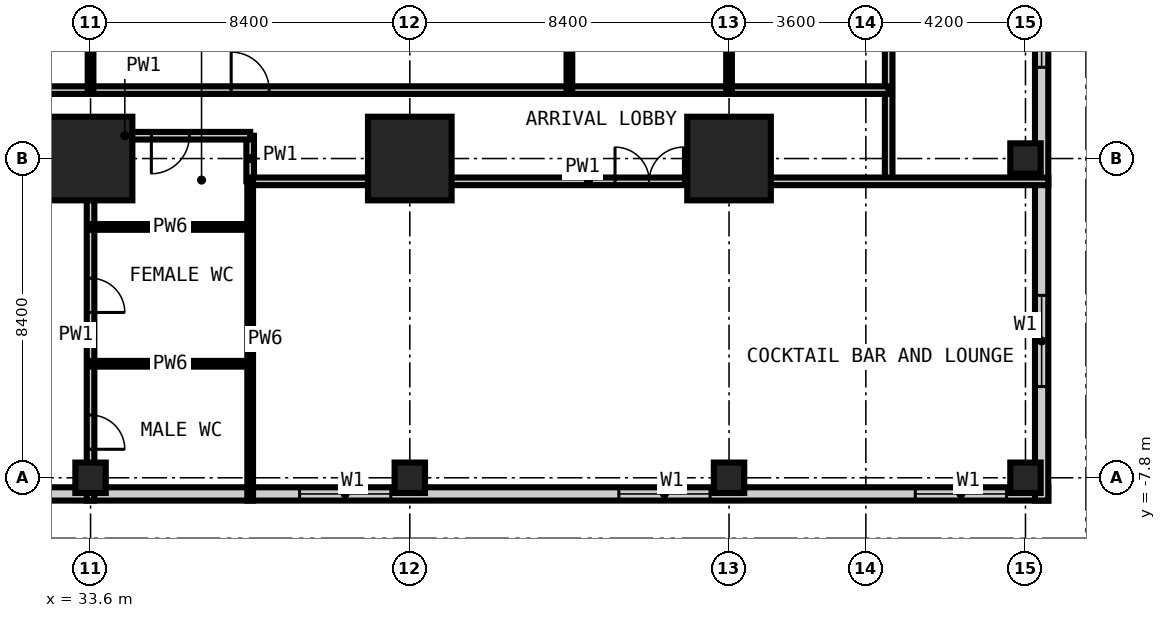
"""IFC4 building model, lengths in metres.
Left out: names, types, materials, properties, quantities, classifications, styles, units other than length and angle.
Written with IfcOpenShell. Run it as: python <this file> out.ifc"""

import sys

from ifc_helpers import new_model, si_unit, direction, frame, frame_2d, origin, origin_2d, place, context, subcontext, project, spatial, rectangle, extrude, element, fill, save


model = new_model("IFC4")
c1 = context("Model", 3, precision=1e-05, world=origin(), true_north=direction((0.0, 1.0)))
c2 = subcontext(c1, "Body", "Model", "MODEL_VIEW")
j1 = project(units=[si_unit("LENGTHUNIT", "METRE"), si_unit("PLANEANGLEUNIT", "RADIAN")], contexts=[c1])
p1 = place(None, origin())
s1 = spatial("IfcSite", under=j1, at=p1, CompositionType="ELEMENT")
p2 = place(p1, origin())
s2 = spatial("IfcBuilding", under=s1, at=p2, CompositionType="ELEMENT")
p3 = place(p2, origin())
s3 = spatial("IfcBuildingStorey", under=s2, at=p3, CompositionType="ELEMENT", Elevation=0.0)
for number, where, z_axis, x_axis in (
    (1, (33.6, 0.6, -0.3), (0.0, 0.0, 1.0), (1.0, 0.0, 0.0)),
    (2, (42.0, 0.6, -0.3), (0.0, 0.0, 1.0), (1.0, 0.0, 0.0)),
    (3, (50.4, 0.6, -0.3), (0.0, 0.0, 1.0), (1.0, 0.0, 0.0)),
):
    element("IfcColumn", number, at=place(p3, frame(where, z_axis=z_axis, x_axis=x_axis)), inside=s3, PredefinedType="COLUMN", context=c2, shape_type="SweptSolid", body=[
        extrude(rectangle(XDim=2.2, YDim=2.2, at=origin_2d()), origin(), (0.0, 0.0, 1.0), 6.0),
    ])
for number, where, z_axis, x_axis in (
    (4, (33.6, -7.8, -0.3), (0.0, 0.0, 1.0), (1.0, 0.0, 0.0)),
    (5, (42.0, -7.8, -0.3), (0.0, 0.0, 1.0), (1.0, 0.0, 0.0)),
    (6, (50.4, -7.8, -0.3), (0.0, 0.0, 1.0), (1.0, 0.0, 0.0)),
    (7, (58.2, -7.8, -0.3), (0.0, 0.0, 1.0), (1.0, 0.0, 0.0)),
    (8, (58.2, 0.6, -0.3), (0.0, 0.0, 1.0), (1.0, 0.0, 0.0)),
):
    element("IfcColumn", number, at=place(p3, frame(where, z_axis=z_axis, x_axis=x_axis)), inside=s3, PredefinedType="COLUMN", context=c2, shape_type="SweptSolid", body=[
        extrude(rectangle(XDim=0.8, YDim=0.8, at=origin_2d()), origin(), (0.0, 0.0, 1.0), 6.0),
    ])
p4 = place(p3, frame((-33.6, -8.225, 0.0), z_axis=(0.0, 0.0, 1.0), x_axis=(1.0, 0.0, 0.0)))
e9 = element("IfcWall", 9, at=p4, inside=s3, PredefinedType="SOLIDWALL", context=c2, shape_type="SweptSolid", body=[
    extrude(rectangle(XDim=92.4, YDim=0.35, at=frame_2d((46.2, 0.0))), origin(), (0.0, 0.0, 1.0), 5.7),
])
p5 = place(p4, frame((5.4, 0.0, 0.0)))
e10 = element("IfcOpeningElement", 10, at=p5, cuts=e9, PredefinedType="OPENING", context=c2, shape_type="SweptSolid", body=[
    extrude(rectangle(XDim=1.8, YDim=2.7, at=frame_2d((0.9, 1.35))), frame((0.0, 0.185, 0.0), z_axis=(0.0, -1.0, 0.0), x_axis=(1.0, 0.0, 0.0)), (0.0, 0.0, 1.0), 0.37),
])
p6 = place(p4, frame((2.8, 0.0, 0.9)))
e11 = element("IfcOpeningElement", 11, at=p6, cuts=e9, PredefinedType="OPENING", context=c2, shape_type="SweptSolid", body=[
    extrude(rectangle(XDim=2.4, YDim=2.4, at=frame_2d((1.2, 1.2))), frame((0.0, 0.185, 0.0), z_axis=(0.0, -1.0, 0.0), x_axis=(1.0, 0.0, 0.0)), (0.0, 0.0, 1.0), 0.37),
])
p7 = place(p4, frame((9.3, 0.0, 0.9)))
e12 = element("IfcOpeningElement", 12, at=p7, cuts=e9, PredefinedType="OPENING", context=c2, shape_type="SweptSolid", body=[
    extrude(rectangle(XDim=2.4, YDim=2.4, at=frame_2d((1.2, 1.2))), frame((0.0, 0.185, 0.0), z_axis=(0.0, -1.0, 0.0), x_axis=(1.0, 0.0, 0.0)), (0.0, 0.0, 1.0), 0.37),
])
p8 = place(p4, frame((13.8, 0.0, 0.9)))
e13 = element("IfcOpeningElement", 13, at=p8, cuts=e9, PredefinedType="OPENING", context=c2, shape_type="SweptSolid", body=[
    extrude(rectangle(XDim=2.4, YDim=2.4, at=frame_2d((1.2, 1.2))), frame((0.0, 0.185, 0.0), z_axis=(0.0, -1.0, 0.0), x_axis=(1.0, 0.0, 0.0)), (0.0, 0.0, 1.0), 0.37),
])
p9 = place(p4, frame((19.3, 0.0, 0.0)))
e14 = element("IfcOpeningElement", 14, at=p9, cuts=e9, PredefinedType="OPENING", context=c2, shape_type="SweptSolid", body=[
    extrude(rectangle(XDim=1.2, YDim=2.4, at=frame_2d((0.6, 1.2))), frame((0.0, 0.185, 0.0), z_axis=(0.0, -1.0, 0.0), x_axis=(1.0, 0.0, 0.0)), (0.0, 0.0, 1.0), 0.37),
])
p10 = place(p4, frame((26.8, 0.0, 0.0)))
e15 = element("IfcOpeningElement", 15, at=p10, cuts=e9, PredefinedType="OPENING", context=c2, shape_type="SweptSolid", body=[
    extrude(rectangle(XDim=2.4, YDim=3.0, at=frame_2d((1.2, 1.5))), frame((0.0, 0.185, 0.0), z_axis=(0.0, -1.0, 0.0), x_axis=(1.0, 0.0, 0.0)), (0.0, 0.0, 1.0), 0.37),
])
p11 = place(p4, frame((36.9, 0.0, 0.0)))
e16 = element("IfcOpeningElement", 16, at=p11, cuts=e9, PredefinedType="OPENING", context=c2, shape_type="SweptSolid", body=[
    extrude(rectangle(XDim=1.8, YDim=2.4, at=frame_2d((0.9, 1.2))), frame((0.0, 0.185, 0.0), z_axis=(0.0, -1.0, 0.0), x_axis=(1.0, 0.0, 0.0)), (0.0, 0.0, 1.0), 0.37),
])
p12 = place(p4, frame((38.9, 0.0, 0.9)))
e17 = element("IfcOpeningElement", 17, at=p12, cuts=e9, PredefinedType="OPENING", context=c2, shape_type="SweptSolid", body=[
    extrude(rectangle(XDim=2.4, YDim=2.4, at=frame_2d((1.2, 1.2))), frame((0.0, 0.185, 0.0), z_axis=(0.0, -1.0, 0.0), x_axis=(1.0, 0.0, 0.0)), (0.0, 0.0, 1.0), 0.37),
])
p13 = place(p4, frame((53.7, 0.0, 0.0)))
e18 = element("IfcOpeningElement", 18, at=p13, cuts=e9, PredefinedType="OPENING", context=c2, shape_type="SweptSolid", body=[
    extrude(rectangle(XDim=1.8, YDim=2.4, at=frame_2d((0.9, 1.2))), frame((0.0, 0.185, 0.0), z_axis=(0.0, -1.0, 0.0), x_axis=(1.0, 0.0, 0.0)), (0.0, 0.0, 1.0), 0.37),
])
p14 = place(p4, frame((51.1, 0.0, 0.9)))
e19 = element("IfcOpeningElement", 19, at=p14, cuts=e9, PredefinedType="OPENING", context=c2, shape_type="SweptSolid", body=[
    extrude(rectangle(XDim=2.4, YDim=2.4, at=frame_2d((1.2, 1.2))), frame((0.0, 0.185, 0.0), z_axis=(0.0, -1.0, 0.0), x_axis=(1.0, 0.0, 0.0)), (0.0, 0.0, 1.0), 0.37),
])
p15 = place(p4, frame((61.8, 0.0, 0.0)))
e20 = element("IfcOpeningElement", 20, at=p15, cuts=e9, PredefinedType="OPENING", context=c2, shape_type="SweptSolid", body=[
    extrude(rectangle(XDim=2.4, YDim=3.0, at=frame_2d((1.2, 1.5))), frame((0.0, 0.185, 0.0), z_axis=(0.0, -1.0, 0.0), x_axis=(1.0, 0.0, 0.0)), (0.0, 0.0, 1.0), 0.37),
])
p16 = place(p4, frame((72.7, 0.0, 0.9)))
e21 = element("IfcOpeningElement", 21, at=p16, cuts=e9, PredefinedType="OPENING", context=c2, shape_type="SweptSolid", body=[
    extrude(rectangle(XDim=2.4, YDim=2.4, at=frame_2d((1.2, 1.2))), frame((0.0, 0.185, 0.0), z_axis=(0.0, -1.0, 0.0), x_axis=(1.0, 0.0, 0.0)), (0.0, 0.0, 1.0), 0.37),
])
p17 = place(p4, frame((81.1, 0.0, 0.9)))
e22 = element("IfcOpeningElement", 22, at=p17, cuts=e9, PredefinedType="OPENING", context=c2, shape_type="SweptSolid", body=[
    extrude(rectangle(XDim=2.4, YDim=2.4, at=frame_2d((1.2, 1.2))), frame((0.0, 0.185, 0.0), z_axis=(0.0, -1.0, 0.0), x_axis=(1.0, 0.0, 0.0)), (0.0, 0.0, 1.0), 0.37),
])
p18 = place(p4, frame((88.9, 0.0, 0.9)))
e23 = element("IfcOpeningElement", 23, at=p18, cuts=e9, PredefinedType="OPENING", context=c2, shape_type="SweptSolid", body=[
    extrude(rectangle(XDim=2.4, YDim=2.4, at=frame_2d((1.2, 1.2))), frame((0.0, 0.185, 0.0), z_axis=(0.0, -1.0, 0.0), x_axis=(1.0, 0.0, 0.0)), (0.0, 0.0, 1.0), 0.37),
])
p19 = place(p3, frame((58.625, -8.4, 0.0), z_axis=(0.0, 0.0, 1.0), x_axis=(0.0, 1.0, 0.0)))
e24 = element("IfcWall", 24, at=p19, inside=s3, PredefinedType="SOLIDWALL", context=c2, shape_type="SweptSolid", body=[
    extrude(rectangle(XDim=67.2, YDim=0.35, at=frame_2d((33.6, 0.0))), origin(), (0.0, 0.0, 1.0), 5.7),
])
p20 = place(p19, frame((3.0, 0.0, 0.9)))
e25 = element("IfcOpeningElement", 25, at=p20, cuts=e24, PredefinedType="OPENING", context=c2, shape_type="SweptSolid", body=[
    extrude(rectangle(XDim=2.4, YDim=2.4, at=frame_2d((1.2, 1.2))), frame((0.0, 0.185, 0.0), z_axis=(0.0, -1.0, 0.0), x_axis=(1.0, 0.0, 0.0)), (0.0, 0.0, 1.0), 0.37),
])
p21 = place(p19, frame((18.1, 0.0, 0.0)))
e26 = element("IfcOpeningElement", 26, at=p21, cuts=e24, PredefinedType="OPENING", context=c2, shape_type="SweptSolid", body=[
    extrude(rectangle(XDim=2.4, YDim=3.0, at=frame_2d((1.2, 1.5))), frame((0.0, 0.185, 0.0), z_axis=(0.0, -1.0, 0.0), x_axis=(1.0, 0.0, 0.0)), (0.0, 0.0, 1.0), 0.37),
])
p22 = place(p19, frame((11.4, 0.0, 0.9)))
e27 = element("IfcOpeningElement", 27, at=p22, cuts=e24, PredefinedType="OPENING", context=c2, shape_type="SweptSolid", body=[
    extrude(rectangle(XDim=2.4, YDim=2.4, at=frame_2d((1.2, 1.2))), frame((0.0, 0.185, 0.0), z_axis=(0.0, -1.0, 0.0), x_axis=(1.0, 0.0, 0.0)), (0.0, 0.0, 1.0), 0.37),
])
p23 = place(p19, frame((20.7, 0.0, 0.9)))
e28 = element("IfcOpeningElement", 28, at=p23, cuts=e24, PredefinedType="OPENING", context=c2, shape_type="SweptSolid", body=[
    extrude(rectangle(XDim=2.4, YDim=2.4, at=frame_2d((1.2, 1.2))), frame((0.0, 0.185, 0.0), z_axis=(0.0, -1.0, 0.0), x_axis=(1.0, 0.0, 0.0)), (0.0, 0.0, 1.0), 0.37),
])
p24 = place(p19, frame((28.2, 0.0, 0.9)))
e29 = element("IfcOpeningElement", 29, at=p24, cuts=e24, PredefinedType="OPENING", context=c2, shape_type="SweptSolid", body=[
    extrude(rectangle(XDim=2.4, YDim=2.4, at=frame_2d((1.2, 1.2))), frame((0.0, 0.185, 0.0), z_axis=(0.0, -1.0, 0.0), x_axis=(1.0, 0.0, 0.0)), (0.0, 0.0, 1.0), 0.37),
])
p25 = place(p19, frame((36.6, 0.0, 0.9)))
e30 = element("IfcOpeningElement", 30, at=p25, cuts=e24, PredefinedType="OPENING", context=c2, shape_type="SweptSolid", body=[
    extrude(rectangle(XDim=2.4, YDim=2.4, at=frame_2d((1.2, 1.2))), frame((0.0, 0.185, 0.0), z_axis=(0.0, -1.0, 0.0), x_axis=(1.0, 0.0, 0.0)), (0.0, 0.0, 1.0), 0.37),
])
p26 = place(p19, frame((45.0, 0.0, 0.9)))
e31 = element("IfcOpeningElement", 31, at=p26, cuts=e24, PredefinedType="OPENING", context=c2, shape_type="SweptSolid", body=[
    extrude(rectangle(XDim=2.4, YDim=2.4, at=frame_2d((1.2, 1.2))), frame((0.0, 0.185, 0.0), z_axis=(0.0, -1.0, 0.0), x_axis=(1.0, 0.0, 0.0)), (0.0, 0.0, 1.0), 0.37),
])
p27 = place(p19, frame((60.1, 0.0, 0.0)))
e32 = element("IfcOpeningElement", 32, at=p27, cuts=e24, PredefinedType="OPENING", context=c2, shape_type="SweptSolid", body=[
    extrude(rectangle(XDim=3.6, YDim=4.5, at=frame_2d((1.8, 2.25))), frame((0.0, 0.185, 0.0), z_axis=(0.0, -1.0, 0.0), x_axis=(1.0, 0.0, 0.0)), (0.0, 0.0, 1.0), 0.37),
])
p28 = place(p19, frame((53.4, 0.0, 0.9)))
e33 = element("IfcOpeningElement", 33, at=p28, cuts=e24, PredefinedType="OPENING", context=c2, shape_type="SweptSolid", body=[
    extrude(rectangle(XDim=2.4, YDim=2.4, at=frame_2d((1.2, 1.2))), frame((0.0, 0.185, 0.0), z_axis=(0.0, -1.0, 0.0), x_axis=(1.0, 0.0, 0.0)), (0.0, 0.0, 1.0), 0.37),
])
p29 = place(p3, frame((33.6, -8.4, 0.0), z_axis=(0.0, 0.0, 1.0), x_axis=(0.0, 1.0, 0.0)))
e34 = element("IfcWall", 34, at=p29, inside=s3, PredefinedType="PARTITIONING", context=c2, shape_type="SweptSolid", body=[
    extrude(rectangle(XDim=9.6, YDim=0.2, at=frame_2d((4.8, 0.0))), origin(), (0.0, 0.0, 1.0), 5.7),
])
p30 = place(p29, frame((1.35, 0.0, 0.0)))
e35 = element("IfcOpeningElement", 35, at=p30, cuts=e34, PredefinedType="OPENING", context=c2, shape_type="SweptSolid", body=[
    extrude(rectangle(XDim=0.9, YDim=2.1, at=frame_2d((0.45, 1.05))), frame((0.0, 0.11, 0.0), z_axis=(0.0, -1.0, 0.0), x_axis=(1.0, 0.0, 0.0)), (0.0, 0.0, 1.0), 0.22),
])
p31 = place(p29, frame((4.95, 0.0, 0.0)))
e36 = element("IfcOpeningElement", 36, at=p31, cuts=e34, PredefinedType="OPENING", context=c2, shape_type="SweptSolid", body=[
    extrude(rectangle(XDim=0.9, YDim=2.1, at=frame_2d((0.45, 1.05))), frame((0.0, 0.11, 0.0), z_axis=(0.0, -1.0, 0.0), x_axis=(1.0, 0.0, 0.0)), (0.0, 0.0, 1.0), 0.22),
])
p32 = place(p3, frame((37.8, 0.0, 0.0), z_axis=(0.0, 0.0, 1.0), x_axis=(0.0, 1.0, 0.0)))
e37 = element("IfcWall", 37, at=p32, inside=s3, PredefinedType="PARTITIONING", context=c2, shape_type="SweptSolid", body=[
    extrude(rectangle(XDim=1.2, YDim=0.2, at=frame_2d((0.6, 0.0))), origin(), (0.0, 0.0, 1.0), 5.7),
])
p33 = place(p3, frame((54.6, 0.0, 0.0), z_axis=(0.0, 0.0, 1.0), x_axis=(0.0, 1.0, 0.0)))
e38 = element("IfcWall", 38, at=p33, inside=s3, PredefinedType="PARTITIONING", context=c2, shape_type="SweptSolid", body=[
    extrude(rectangle(XDim=16.8, YDim=0.2, at=frame_2d((8.4, 0.0))), origin(), (0.0, 0.0, 1.0), 5.7),
])
p34 = place(p33, frame((13.8, 0.0, 0.0)))
e39 = element("IfcOpeningElement", 39, at=p34, cuts=e38, PredefinedType="OPENING", context=c2, shape_type="SweptSolid", body=[
    extrude(rectangle(XDim=1.8, YDim=2.4, at=frame_2d((0.9, 1.2))), frame((0.0, 0.11, 0.0), z_axis=(0.0, -1.0, 0.0), x_axis=(1.0, 0.0, 0.0)), (0.0, 0.0, 1.0), 0.22),
])
p35 = place(p33, frame((5.4, 0.0, 0.0)))
e40 = element("IfcOpeningElement", 40, at=p35, cuts=e38, PredefinedType="OPENING", context=c2, shape_type="SweptSolid", body=[
    extrude(rectangle(XDim=1.8, YDim=2.4, at=frame_2d((0.9, 1.2))), frame((0.0, 0.11, 0.0), z_axis=(0.0, -1.0, 0.0), x_axis=(1.0, 0.0, 0.0)), (0.0, 0.0, 1.0), 0.22),
])
p36 = place(p3, frame((37.8, 0.0, 0.0), z_axis=(0.0, 0.0, 1.0), x_axis=(1.0, 0.0, 0.0)))
e41 = element("IfcWall", 41, at=p36, inside=s3, PredefinedType="PARTITIONING", context=c2, shape_type="SweptSolid", body=[
    extrude(rectangle(XDim=21.0, YDim=0.2, at=frame_2d((10.5, 0.0))), origin(), (0.0, 0.0, 1.0), 5.7),
])
p37 = place(p36, frame((9.6, 0.0, 0.0)))
e42 = element("IfcOpeningElement", 42, at=p37, cuts=e41, PredefinedType="OPENING", context=c2, shape_type="SweptSolid", body=[
    extrude(rectangle(XDim=1.8, YDim=2.4, at=frame_2d((0.9, 1.2))), frame((0.0, 0.11, 0.0), z_axis=(0.0, -1.0, 0.0), x_axis=(1.0, 0.0, 0.0)), (0.0, 0.0, 1.0), 0.22),
])
p38 = place(p3, frame((33.6, 1.2, 0.0), z_axis=(0.0, 0.0, 1.0), x_axis=(1.0, 0.0, 0.0)))
e43 = element("IfcWall", 43, at=p38, inside=s3, PredefinedType="PARTITIONING", context=c2, shape_type="SweptSolid", body=[
    extrude(rectangle(XDim=4.2, YDim=0.2, at=frame_2d((2.1, 0.0))), origin(), (0.0, 0.0, 1.0), 5.7),
])
p39 = place(p38, frame((1.6, 0.0, 0.0)))
e44 = element("IfcOpeningElement", 44, at=p39, cuts=e43, PredefinedType="OPENING", context=c2, shape_type="SweptSolid", body=[
    extrude(rectangle(XDim=1.0, YDim=2.1, at=frame_2d((0.5, 1.05))), frame((0.0, 0.11, 0.0), z_axis=(0.0, -1.0, 0.0), x_axis=(1.0, 0.0, 0.0)), (0.0, 0.0, 1.0), 0.22),
])
p40 = place(p3, frame((0.0, 2.4, 0.0), z_axis=(0.0, 0.0, 1.0), x_axis=(1.0, 0.0, 0.0)))
e45 = element("IfcWall", 45, at=p40, inside=s3, PredefinedType="PARTITIONING", context=c2, shape_type="SweptSolid", body=[
    extrude(rectangle(XDim=54.6, YDim=0.2, at=frame_2d((27.3, 0.0))), origin(), (0.0, 0.0, 1.0), 5.7),
])
p41 = place(p40, frame((5.8, 0.0, 0.0)))
e46 = element("IfcOpeningElement", 46, at=p41, cuts=e45, PredefinedType="OPENING", context=c2, shape_type="SweptSolid", body=[
    extrude(rectangle(XDim=1.0, YDim=2.1, at=frame_2d((0.5, 1.05))), frame((0.0, 0.11, 0.0), z_axis=(0.0, -1.0, 0.0), x_axis=(1.0, 0.0, 0.0)), (0.0, 0.0, 1.0), 0.22),
])
p42 = place(p40, frame((18.4, 0.0, 0.0)))
e47 = element("IfcOpeningElement", 47, at=p42, cuts=e45, PredefinedType="OPENING", context=c2, shape_type="SweptSolid", body=[
    extrude(rectangle(XDim=1.0, YDim=2.1, at=frame_2d((0.5, 1.05))), frame((0.0, 0.11, 0.0), z_axis=(0.0, -1.0, 0.0), x_axis=(1.0, 0.0, 0.0)), (0.0, 0.0, 1.0), 0.22),
])
p43 = place(p40, frame((28.9, 0.0, 0.0)))
e48 = element("IfcOpeningElement", 48, at=p43, cuts=e45, PredefinedType="OPENING", context=c2, shape_type="SweptSolid", body=[
    extrude(rectangle(XDim=1.0, YDim=2.1, at=frame_2d((0.5, 1.05))), frame((0.0, 0.11, 0.0), z_axis=(0.0, -1.0, 0.0), x_axis=(1.0, 0.0, 0.0)), (0.0, 0.0, 1.0), 0.22),
])
p44 = place(p40, frame((37.3, 0.0, 0.0)))
e49 = element("IfcOpeningElement", 49, at=p44, cuts=e45, PredefinedType="OPENING", context=c2, shape_type="SweptSolid", body=[
    extrude(rectangle(XDim=1.0, YDim=2.1, at=frame_2d((0.5, 1.05))), frame((0.0, 0.11, 0.0), z_axis=(0.0, -1.0, 0.0), x_axis=(1.0, 0.0, 0.0)), (0.0, 0.0, 1.0), 0.22),
])
p45 = place(p3, frame((33.6, 2.4, 0.0), z_axis=(0.0, 0.0, 1.0), x_axis=(0.0, 1.0, 0.0)))
e50 = element("IfcWall", 50, at=p45, inside=s3, PredefinedType="PARTITIONING", context=c2, shape_type="SweptSolid", body=[
    extrude(rectangle(XDim=9.7, YDim=0.15, at=frame_2d((4.85, 0.0))), origin(), (0.0, 0.0, 1.0), 5.7),
])
p46 = place(p3, frame((37.8, -8.4, 0.0), z_axis=(0.0, 0.0, 1.0), x_axis=(0.0, 1.0, 0.0)))
e51 = element("IfcWall", 51, at=p46, inside=s3, PredefinedType="PARTITIONING", context=c2, shape_type="SweptSolid", body=[
    extrude(rectangle(XDim=8.4, YDim=0.15, at=frame_2d((4.2, 0.0))), origin(), (0.0, 0.0, 1.0), 5.7),
])
p47 = place(p3, frame((46.2, 2.4, 0.0), z_axis=(0.0, 0.0, 1.0), x_axis=(0.0, 1.0, 0.0)))
e52 = element("IfcWall", 52, at=p47, inside=s3, PredefinedType="PARTITIONING", context=c2, shape_type="SweptSolid", body=[
    extrude(rectangle(XDim=9.7, YDim=0.15, at=frame_2d((4.85, 0.0))), origin(), (0.0, 0.0, 1.0), 5.7),
])
p48 = place(p3, frame((50.4, 2.4, 0.0), z_axis=(0.0, 0.0, 1.0), x_axis=(0.0, 1.0, 0.0)))
e53 = element("IfcWall", 53, at=p48, inside=s3, PredefinedType="PARTITIONING", context=c2, shape_type="SweptSolid", body=[
    extrude(rectangle(XDim=10.2, YDim=0.15, at=frame_2d((5.1, 0.0))), origin(), (0.0, 0.0, 1.0), 5.7),
])
for number, where, z_axis, x_axis in (
    (54, (33.6, -4.8, 0.0), (0.0, 0.0, 1.0), (1.0, 0.0, 0.0)),
    (55, (33.6, -1.2, 0.0), (0.0, 0.0, 1.0), (1.0, 0.0, 0.0)),
):
    element("IfcWall", number, at=place(p3, frame(where, z_axis=z_axis, x_axis=x_axis)), inside=s3, PredefinedType="PARTITIONING", context=c2, shape_type="SweptSolid", body=[
        extrude(rectangle(XDim=4.2, YDim=0.15, at=frame_2d((2.1, 0.0))), origin(), (0.0, 0.0, 1.0), 5.7),
    ])
p49 = place(p16, origin())
e56 = element("IfcWindow", 56, at=p49, inside=s3, PartitioningType="SINGLE_PANEL", PredefinedType="WINDOW", context=c2, shape_type="SweptSolid", body=[
    extrude(rectangle(XDim=2.4, YDim=2.4, at=frame_2d((1.2, 1.2))), frame((0.0, 0.03, 0.0), z_axis=(0.0, -1.0, 0.0), x_axis=(1.0, 0.0, 0.0)), (0.0, 0.0, 1.0), 0.06),
])
fill(e21, e56)
p50 = place(p17, origin())
e57 = element("IfcWindow", 57, at=p50, inside=s3, PartitioningType="SINGLE_PANEL", PredefinedType="WINDOW", context=c2, shape_type="SweptSolid", body=[
    extrude(rectangle(XDim=2.4, YDim=2.4, at=frame_2d((1.2, 1.2))), frame((0.0, 0.03, 0.0), z_axis=(0.0, -1.0, 0.0), x_axis=(1.0, 0.0, 0.0)), (0.0, 0.0, 1.0), 0.06),
])
fill(e22, e57)
p51 = place(p18, origin())
e58 = element("IfcWindow", 58, at=p51, inside=s3, PartitioningType="SINGLE_PANEL", PredefinedType="WINDOW", context=c2, shape_type="SweptSolid", body=[
    extrude(rectangle(XDim=2.4, YDim=2.4, at=frame_2d((1.2, 1.2))), frame((0.0, 0.03, 0.0), z_axis=(0.0, -1.0, 0.0), x_axis=(1.0, 0.0, 0.0)), (0.0, 0.0, 1.0), 0.06),
])
fill(e23, e58)
p52 = place(p20, origin())
e59 = element("IfcWindow", 59, at=p52, inside=s3, PartitioningType="SINGLE_PANEL", PredefinedType="WINDOW", context=c2, shape_type="SweptSolid", body=[
    extrude(rectangle(XDim=2.4, YDim=2.4, at=frame_2d((1.2, 1.2))), frame((0.0, 0.03, 0.0), z_axis=(0.0, -1.0, 0.0), x_axis=(1.0, 0.0, 0.0)), (0.0, 0.0, 1.0), 0.06),
])
fill(e25, e59)
p53 = place(p22, origin())
e60 = element("IfcWindow", 60, at=p53, inside=s3, PartitioningType="SINGLE_PANEL", PredefinedType="WINDOW", context=c2, shape_type="SweptSolid", body=[
    extrude(rectangle(XDim=2.4, YDim=2.4, at=frame_2d((1.2, 1.2))), frame((0.0, 0.03, 0.0), z_axis=(0.0, -1.0, 0.0), x_axis=(1.0, 0.0, 0.0)), (0.0, 0.0, 1.0), 0.06),
])
fill(e27, e60)
p54 = place(p37, origin())
e61 = element("IfcDoor", 61, at=p54, inside=s3, OperationType="DOUBLE_DOOR_DOUBLE_SWING", PredefinedType="DOOR", context=c2, shape_type="SweptSolid", body=[
    extrude(rectangle(XDim=1.8, YDim=2.4, at=frame_2d((0.9, 1.2))), frame((0.0, 0.025, 0.0), z_axis=(0.0, -1.0, 0.0), x_axis=(1.0, 0.0, 0.0)), (0.0, 0.0, 1.0), 0.05),
])
fill(e42, e61)
p55 = place(p30, frame((0.9, 0.0, 0.0), z_axis=(0.0, 0.0, 1.0), x_axis=(-1.0, 0.0, 0.0)))
e62 = element("IfcDoor", 62, at=p55, inside=s3, OperationType="SINGLE_SWING_RIGHT", PredefinedType="DOOR", context=c2, shape_type="SweptSolid", body=[
    extrude(rectangle(XDim=0.9, YDim=2.1, at=frame_2d((0.45, 1.05))), frame((0.0, 0.025, 0.0), z_axis=(0.0, -1.0, 0.0), x_axis=(1.0, 0.0, 0.0)), (0.0, 0.0, 1.0), 0.05),
])
fill(e35, e62)
p56 = place(p31, frame((0.9, 0.0, 0.0), z_axis=(0.0, 0.0, 1.0), x_axis=(-1.0, 0.0, 0.0)))
e63 = element("IfcDoor", 63, at=p56, inside=s3, OperationType="SINGLE_SWING_RIGHT", PredefinedType="DOOR", context=c2, shape_type="SweptSolid", body=[
    extrude(rectangle(XDim=0.9, YDim=2.1, at=frame_2d((0.45, 1.05))), frame((0.0, 0.025, 0.0), z_axis=(0.0, -1.0, 0.0), x_axis=(1.0, 0.0, 0.0)), (0.0, 0.0, 1.0), 0.05),
])
fill(e36, e63)
p57 = place(p39, frame((1.0, 0.0, 0.0), z_axis=(0.0, 0.0, 1.0), x_axis=(-1.0, 0.0, 0.0)))
e64 = element("IfcDoor", 64, at=p57, inside=s3, OperationType="SINGLE_SWING_RIGHT", PredefinedType="DOOR", context=c2, shape_type="SweptSolid", body=[
    extrude(rectangle(XDim=1.0, YDim=2.1, at=frame_2d((0.5, 1.05))), frame((0.0, 0.025, 0.0), z_axis=(0.0, -1.0, 0.0), x_axis=(1.0, 0.0, 0.0)), (0.0, 0.0, 1.0), 0.05),
])
fill(e44, e64)
p58 = place(p44, origin())
e65 = element("IfcDoor", 65, at=p58, inside=s3, OperationType="SINGLE_SWING_LEFT", PredefinedType="DOOR", context=c2, shape_type="SweptSolid", body=[
    extrude(rectangle(XDim=1.0, YDim=2.1, at=frame_2d((0.5, 1.05))), frame((0.0, 0.025, 0.0), z_axis=(0.0, -1.0, 0.0), x_axis=(1.0, 0.0, 0.0)), (0.0, 0.0, 1.0), 0.05),
])
fill(e49, e65)
save(model, sys.argv[1])
